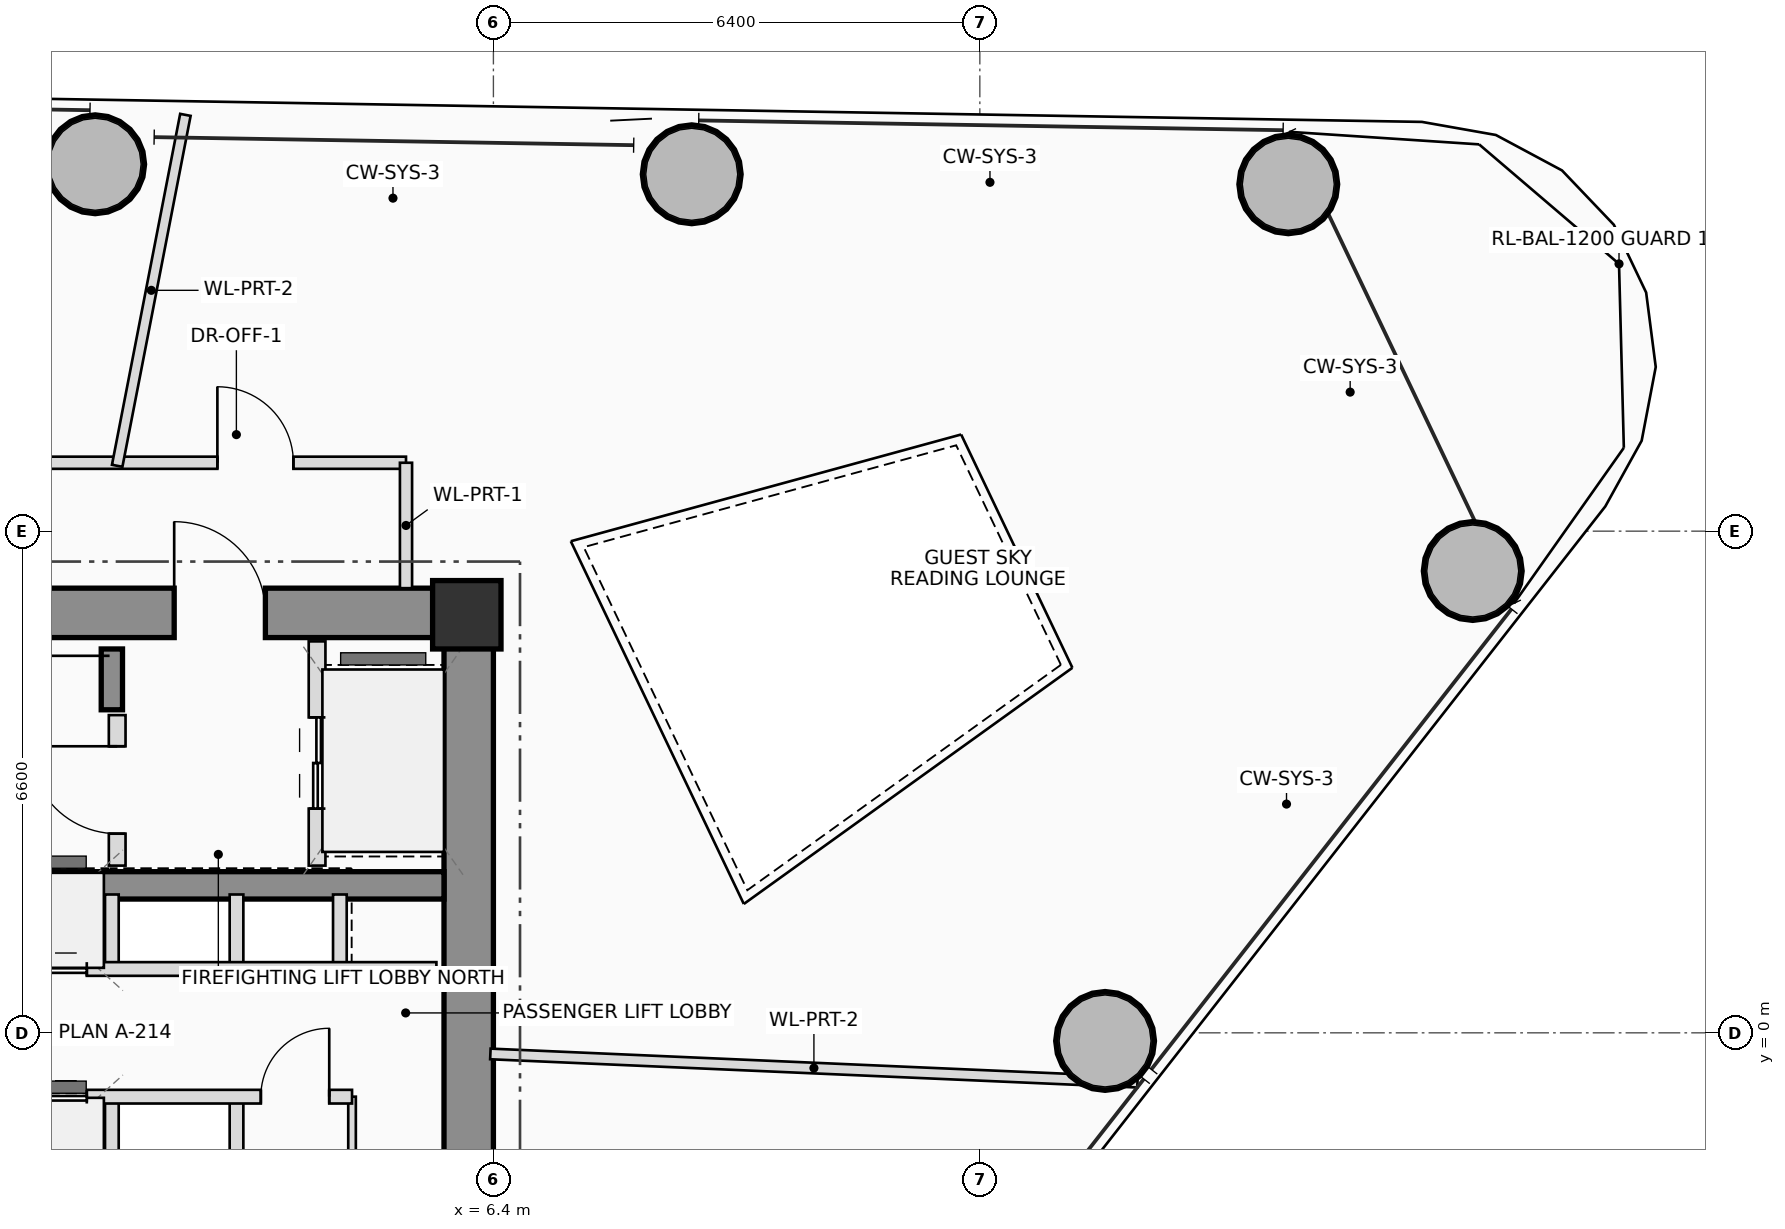
"""IFC4 building model, lengths in metres.
Left out: names, types, materials, properties, quantities, classifications, styles, units other than length and angle.
Written with IfcOpenShell. Run it as: python <this file> out.ifc"""

import sys

from ifc_helpers import new_model, si_unit, direction, frame, frame_2d, origin, origin_2d, place, context, subcontext, project, spatial, rectangle, hollow_circle, extrude, source, transform, mapped, element, fill, save


model = new_model("IFC4")
c1 = context("Model", 3, precision=1e-05, world=origin(), true_north=direction((0.0, 1.0)))
c2 = subcontext(c1, "Body", "Model", "MODEL_VIEW")
j1 = project(units=[si_unit("LENGTHUNIT", "METRE"), si_unit("PLANEANGLEUNIT", "RADIAN")], contexts=[c1])
p1 = place(None, origin())
s1 = spatial("IfcSite", under=j1, at=p1, CompositionType="ELEMENT")
p2 = place(p1, origin())
s2 = spatial("IfcBuilding", under=s1, at=p2, CompositionType="ELEMENT")
p3 = place(p2, frame((0.0, 0.0, 146.75)))
s3 = spatial("IfcBuildingStorey", under=s2, at=p3, CompositionType="ELEMENT", Elevation=146.75)
m1 = source(origin(), c2, "Body", "SweptSolid", [
    extrude(rectangle(XDim=0.9, YDim=0.9, at=origin_2d()), origin(), (0.0, 0.0, 1.0), 3.45),
])
p4 = place(p3, frame((6.05, 5.5, 0.0), z_axis=(0.0, 0.0, 1.0), x_axis=(1.0, 0.0, 0.0)))
e1 = element("IfcColumn", 1, at=p4, inside=s3, PredefinedType="COLUMN", context=c2, shape_type="MappedRepresentation", body=[
    mapped(m1, transform((0.0, 0.0, 0.0), scale=1.0)),
])
p5 = place(p3, frame((-6.4, 5.525, 0.0), z_axis=(0.0, 0.0, 1.0), x_axis=(1.0, 0.0, 0.0)))
e2 = element("IfcWall", 2, at=p5, inside=s3, PredefinedType="SHEAR", context=c2, shape_type="SweptSolid", body=[
    extrude(rectangle(XDim=12.8, YDim=0.65, at=frame_2d((6.4, 0.0))), origin(), (0.0, 0.0, 1.0), 3.45),
])
p6 = place(p5, frame((8.6, 0.0, 0.0)))
e3 = element("IfcOpeningElement", 3, at=p6, cuts=e2, PredefinedType="OPENING", context=c2, shape_type="SweptSolid", body=[
    extrude(rectangle(XDim=1.2, YDim=2.2, at=frame_2d((0.6, 1.1))), frame((0.0, 0.335, 0.0), z_axis=(0.0, -1.0, 0.0), x_axis=(1.0, 0.0, 0.0)), (0.0, 0.0, 1.0), 0.67),
])
p7 = place(p3, frame((6.075, -5.2, 0.0), z_axis=(0.0, 0.0, 1.0), x_axis=(0.0, 1.0, 0.0)))
e4 = element("IfcWall", 4, at=p7, inside=s3, PredefinedType="SHEAR", context=c2, shape_type="SweptSolid", body=[
    extrude(rectangle(XDim=10.4, YDim=0.65, at=frame_2d((5.2, 0.0))), origin(), (0.0, 0.0, 1.0), 3.45),
])
p8 = place(p3, frame((-5.75, 1.94, 0.0), z_axis=(0.0, 0.0, 1.0), x_axis=(1.0, 0.0, 0.0)))
e5 = element("IfcWall", 5, at=p8, inside=s3, PredefinedType="SHEAR", context=c2, shape_type="SweptSolid", body=[
    extrude(rectangle(XDim=11.5, YDim=0.36, at=frame_2d((5.75, 0.0))), origin(), (0.0, 0.0, 1.0), 3.45),
])
p9 = place(p3, frame((1.38, 4.25, 0.0), z_axis=(0.0, 0.0, 1.0), x_axis=(0.0, 1.0, 0.0)))
e6 = element("IfcWall", 6, at=p9, inside=s3, PredefinedType="SHEAR", context=c2, shape_type="SweptSolid", body=[
    extrude(rectangle(XDim=0.8, YDim=0.28, at=frame_2d((0.4, 0.0))), origin(), (0.0, 0.0, 1.0), 3.45),
])
m2 = source(origin(), c2, "Body", "SweptSolid", [
    extrude(hollow_circle(Radius=0.65, WallThickness=0.045, at=origin_2d()), origin(), (0.0, 0.0, 1.0), 3.45),
])
for number, where, z_axis, x_axis in (
    (7, (14.448, -0.107, 0.0), (0.0, 0.0, 1.0), (1.0, 0.0, 0.0)),
    (8, (19.285, 6.076, 0.0), (0.0, 0.0, 1.0), (1.0, 0.0, 0.0)),
    (9, (16.858, 11.164, 0.0), (0.0, 0.0, 1.0), (1.0, 0.0, 0.0)),
    (10, (9.01, 11.295, 0.0), (0.0, 0.0, 1.0), (1.0, 0.0, 0.0)),
    (11, (1.16, 11.427, 0.0), (0.0, 0.0, 1.0), (1.0, 0.0, 0.0)),
):
    element("IfcColumn", number, at=place(p3, frame(where, z_axis=z_axis, x_axis=x_axis)), inside=s3, PredefinedType="COLUMN", context=c2, shape_type="MappedRepresentation", body=[
        mapped(m2, transform((0.0, 0.0, 0.0), scale=1.0)),
    ])
p10 = place(p3, frame((1.45, 2.2, 0.0), z_axis=(0.0, 0.0, 1.0), x_axis=(0.0, 1.0, 0.0)))
e12 = element("IfcWall", 12, at=p10, inside=s3, PredefinedType="PLUMBINGWALL", context=c2, shape_type="SweptSolid", body=[
    extrude(rectangle(XDim=1.98, YDim=0.22, at=frame_2d((0.99, 0.0))), origin(), (0.0, 0.0, 1.0), 3.25),
])
p11 = place(p10, frame((0.42, 0.0, 0.0)))
e13 = element("IfcOpeningElement", 13, at=p11, cuts=e12, PredefinedType="OPENING", context=c2, shape_type="SweptSolid", body=[
    extrude(rectangle(XDim=1.15, YDim=2.15, at=frame_2d((0.575, 1.075))), frame((0.0, 0.12, 0.0), z_axis=(0.0, -1.0, 0.0), x_axis=(1.0, 0.0, 0.0)), (0.0, 0.0, 1.0), 0.24),
])
p12 = place(p3, frame((4.08, 2.2, 0.0), z_axis=(0.0, 0.0, 1.0), x_axis=(0.0, 1.0, 0.0)))
e14 = element("IfcWall", 14, at=p12, inside=s3, PredefinedType="PLUMBINGWALL", context=c2, shape_type="SweptSolid", body=[
    extrude(rectangle(XDim=2.95, YDim=0.22, at=frame_2d((1.475, 0.0))), origin(), (0.0, 0.0, 1.0), 3.25),
])
p13 = place(p12, frame((0.75, 0.0, 0.0)))
e15 = element("IfcOpeningElement", 15, at=p13, cuts=e14, PredefinedType="OPENING", context=c2, shape_type="SweptSolid", body=[
    extrude(rectangle(XDim=1.2, YDim=2.25, at=frame_2d((0.6, 1.125))), frame((0.0, 0.12, 0.0), z_axis=(0.0, -1.0, 0.0), x_axis=(1.0, 0.0, 0.0)), (0.0, 0.0, 1.0), 0.24),
])
for number, where, z_axis, x_axis in (
    (16, (1.38, 0.84, 0.0), (0.0, 0.0, 1.0), (0.0, 1.0, 0.0)),
    (17, (1.38, -1.82, 0.0), (0.0, 0.0, 1.0), (0.0, 1.0, 0.0)),
    (18, (3.02, 0.84, 0.0), (0.0, 0.0, 1.0), (0.0, 1.0, 0.0)),
    (19, (4.38, 0.84, 0.0), (0.0, 0.0, 1.0), (0.0, 1.0, 0.0)),
    (20, (3.02, -1.82, 0.0), (0.0, 0.0, 1.0), (0.0, 1.0, 0.0)),
):
    element("IfcWall", number, at=place(p3, frame(where, z_axis=z_axis, x_axis=x_axis)), inside=s3, PredefinedType="PLUMBINGWALL", context=c2, shape_type="SweptSolid", body=[
        extrude(rectangle(XDim=0.98, YDim=0.18, at=frame_2d((0.49, 0.0))), origin(), (0.0, 0.0, 1.0), 3.25),
    ])
p14 = place(p3, frame((4.54, -1.82, 0.0), z_axis=(0.0, 0.0, 1.0), x_axis=(0.0, 1.0, 0.0)))
e21 = element("IfcWall", 21, at=p14, inside=s3, PredefinedType="PARTITIONING", context=c2, shape_type="SweptSolid", body=[
    extrude(rectangle(XDim=0.98, YDim=0.1, at=frame_2d((0.49, 0.0))), origin(), (0.0, 0.0, 1.0), 3.25),
])
p15 = place(p3, frame((-5.68, 0.84, 0.0), z_axis=(0.0, 0.0, 1.0), x_axis=(1.0, 0.0, 0.0)))
e22 = element("IfcWall", 22, at=p15, inside=s3, PredefinedType="PLUMBINGWALL", context=c2, shape_type="SweptSolid", body=[
    extrude(rectangle(XDim=11.33, YDim=0.18, at=frame_2d((5.665, 0.0))), origin(), (0.0, 0.0, 1.0), 3.25),
])
p16 = place(p15, frame((1.38, 0.0, 0.0)))
e23 = element("IfcOpeningElement", 23, at=p16, cuts=e22, PredefinedType="OPENING", context=c2, shape_type="SweptSolid", body=[
    extrude(rectangle(XDim=0.9, YDim=2.05, at=frame_2d((0.45, 1.025))), frame((0.0, 0.1, 0.0), z_axis=(0.0, -1.0, 0.0), x_axis=(1.0, 0.0, 0.0)), (0.0, 0.0, 1.0), 0.2),
])
p17 = place(p15, frame((3.93, 0.0, 0.0)))
e24 = element("IfcOpeningElement", 24, at=p17, cuts=e22, PredefinedType="OPENING", context=c2, shape_type="SweptSolid", body=[
    extrude(rectangle(XDim=1.1, YDim=2.2, at=frame_2d((0.55, 1.1))), frame((0.0, 0.1, 0.0), z_axis=(0.0, -1.0, 0.0), x_axis=(1.0, 0.0, 0.0)), (0.0, 0.0, 1.0), 0.2),
])
p18 = place(p15, frame((5.63, 0.0, 0.0)))
e25 = element("IfcOpeningElement", 25, at=p18, cuts=e22, PredefinedType="OPENING", context=c2, shape_type="SweptSolid", body=[
    extrude(rectangle(XDim=1.1, YDim=2.2, at=frame_2d((0.55, 1.1))), frame((0.0, 0.1, 0.0), z_axis=(0.0, -1.0, 0.0), x_axis=(1.0, 0.0, 0.0)), (0.0, 0.0, 1.0), 0.2),
])
p19 = place(p3, frame((-5.68, -0.84, 0.0), z_axis=(0.0, 0.0, 1.0), x_axis=(1.0, 0.0, 0.0)))
e26 = element("IfcWall", 26, at=p19, inside=s3, PredefinedType="PLUMBINGWALL", context=c2, shape_type="SweptSolid", body=[
    extrude(rectangle(XDim=10.22, YDim=0.18, at=frame_2d((5.11, 0.0))), origin(), (0.0, 0.0, 1.0), 3.25),
])
p20 = place(p19, frame((1.38, 0.0, 0.0)))
e27 = element("IfcOpeningElement", 27, at=p20, cuts=e26, PredefinedType="OPENING", context=c2, shape_type="SweptSolid", body=[
    extrude(rectangle(XDim=0.9, YDim=2.05, at=frame_2d((0.45, 1.025))), frame((0.0, 0.1, 0.0), z_axis=(0.0, -1.0, 0.0), x_axis=(1.0, 0.0, 0.0)), (0.0, 0.0, 1.0), 0.2),
])
p21 = place(p19, frame((3.93, 0.0, 0.0)))
e28 = element("IfcOpeningElement", 28, at=p21, cuts=e26, PredefinedType="OPENING", context=c2, shape_type="SweptSolid", body=[
    extrude(rectangle(XDim=1.1, YDim=2.2, at=frame_2d((0.55, 1.1))), frame((0.0, 0.1, 0.0), z_axis=(0.0, -1.0, 0.0), x_axis=(1.0, 0.0, 0.0)), (0.0, 0.0, 1.0), 0.2),
])
p22 = place(p19, frame((5.63, 0.0, 0.0)))
e29 = element("IfcOpeningElement", 29, at=p22, cuts=e26, PredefinedType="OPENING", context=c2, shape_type="SweptSolid", body=[
    extrude(rectangle(XDim=1.1, YDim=2.2, at=frame_2d((0.55, 1.1))), frame((0.0, 0.1, 0.0), z_axis=(0.0, -1.0, 0.0), x_axis=(1.0, 0.0, 0.0)), (0.0, 0.0, 1.0), 0.2),
])
p23 = place(p19, frame((9.02, 0.0, 0.0)))
e30 = element("IfcOpeningElement", 30, at=p23, cuts=e26, PredefinedType="OPENING", context=c2, shape_type="SweptSolid", body=[
    extrude(rectangle(XDim=0.9, YDim=2.05, at=frame_2d((0.45, 1.025))), frame((0.0, 0.1, 0.0), z_axis=(0.0, -1.0, 0.0), x_axis=(1.0, 0.0, 0.0)), (0.0, 0.0, 1.0), 0.2),
])
p24 = place(p3, frame((-6.36, 7.5, 0.0), z_axis=(0.0, 0.0, 1.0), x_axis=(1.0, 0.0, 0.0)))
e31 = element("IfcWall", 31, at=p24, inside=s3, PredefinedType="PARTITIONING", context=c2, shape_type="SweptSolid", body=[
    extrude(rectangle(XDim=11.61, YDim=0.16, at=frame_2d((5.805, 0.0))), origin(), (0.0, 0.0, 1.0), 2.605),
])
p25 = place(p24, frame((9.128, 0.0, 0.0)))
e32 = element("IfcOpeningElement", 32, at=p25, cuts=e31, PredefinedType="OPENING", context=c2, shape_type="SweptSolid", body=[
    extrude(rectangle(XDim=1.0, YDim=2.25, at=frame_2d((0.5, 1.125))), frame((0.0, 0.09, 0.0), z_axis=(0.0, -1.0, 0.0), x_axis=(1.0, 0.0, 0.0)), (0.0, 0.0, 1.0), 0.18),
])
p26 = place(p3, frame((5.25, 7.5, 0.0), z_axis=(0.0, 0.0, 1.0), x_axis=(0.0, -1.0, 0.0)))
e33 = element("IfcWall", 33, at=p26, inside=s3, PredefinedType="PARTITIONING", context=c2, shape_type="SweptSolid", body=[
    extrude(rectangle(XDim=1.65, YDim=0.16, at=frame_2d((0.825, 0.0))), origin(), (0.0, 0.0, 1.0), 2.605),
])
p27 = place(p3, frame((6.36, -0.278, 0.0), z_axis=(0.0, 0.0, 1.0), x_axis=(0.999047707238, -0.043631166178, 0.0)))
e34 = element("IfcWall", 34, at=p27, inside=s3, PredefinedType="PARTITIONING", context=c2, shape_type="SweptSolid", body=[
    extrude(rectangle(XDim=8.522, YDim=0.14, at=frame_2d((4.261, 0.0))), origin(), (0.0, 0.0, 1.0), 2.605),
])
p28 = place(p3, frame((1.45, 7.46, 0.0), z_axis=(0.0, 0.0, 1.0), x_axis=(0.190762676882, 0.981636185717, 0.0)))
e35 = element("IfcWall", 35, at=p28, inside=s3, PredefinedType="PARTITIONING", context=c2, shape_type="SweptSolid", body=[
    extrude(rectangle(XDim=4.703, YDim=0.14, at=frame_2d((2.352, 0.0))), origin(), (0.0, 0.0, 1.0), 2.605),
])
p29 = place(p6, origin())
e36 = element("IfcDoor", 36, at=p29, inside=s3, OperationType="SINGLE_SWING_LEFT", PredefinedType="DOOR", context=c2, shape_type="SweptSolid", body=[
    extrude(rectangle(XDim=1.2, YDim=2.2, at=frame_2d((0.6, 1.1))), frame((0.0, 0.025, 0.0), z_axis=(0.0, -1.0, 0.0), x_axis=(1.0, 0.0, 0.0)), (0.0, 0.0, 1.0), 0.05),
])
fill(e3, e36)
p30 = place(p11, origin())
e37 = element("IfcDoor", 37, at=p30, inside=s3, OperationType="SINGLE_SWING_RIGHT", PredefinedType="DOOR", context=c2, shape_type="SweptSolid", body=[
    extrude(rectangle(XDim=1.15, YDim=2.15, at=frame_2d((0.575, 1.075))), frame((0.0, 0.025, 0.0), z_axis=(0.0, -1.0, 0.0), x_axis=(1.0, 0.0, 0.0)), (0.0, 0.0, 1.0), 0.05),
])
fill(e13, e37)
p31 = place(p13, origin())
e38 = element("IfcDoor", 38, at=p31, inside=s3, OperationType="DOUBLE_DOOR_SLIDING", PredefinedType="DOOR", context=c2, shape_type="SweptSolid", body=[
    extrude(rectangle(XDim=1.2, YDim=2.25, at=frame_2d((0.6, 1.125))), frame((0.0, 0.025, 0.0), z_axis=(0.0, -1.0, 0.0), x_axis=(1.0, 0.0, 0.0)), (0.0, 0.0, 1.0), 0.05),
])
fill(e15, e38)
p32 = place(p18, origin())
e39 = element("IfcDoor", 39, at=p32, inside=s3, OperationType="DOUBLE_DOOR_SLIDING", PredefinedType="DOOR", context=c2, shape_type="SweptSolid", body=[
    extrude(rectangle(XDim=1.1, YDim=2.2, at=frame_2d((0.55, 1.1))), frame((0.0, 0.025, 0.0), z_axis=(0.0, -1.0, 0.0), x_axis=(1.0, 0.0, 0.0)), (0.0, 0.0, 1.0), 0.05),
])
fill(e25, e39)
p33 = place(p22, origin())
e40 = element("IfcDoor", 40, at=p33, inside=s3, OperationType="DOUBLE_DOOR_SLIDING", PredefinedType="DOOR", context=c2, shape_type="SweptSolid", body=[
    extrude(rectangle(XDim=1.1, YDim=2.2, at=frame_2d((0.55, 1.1))), frame((0.0, 0.025, 0.0), z_axis=(0.0, -1.0, 0.0), x_axis=(1.0, 0.0, 0.0)), (0.0, 0.0, 1.0), 0.05),
])
fill(e29, e40)
p34 = place(p23, origin())
e41 = element("IfcDoor", 41, at=p34, inside=s3, OperationType="SINGLE_SWING_RIGHT", PredefinedType="DOOR", context=c2, shape_type="SweptSolid", body=[
    extrude(rectangle(XDim=0.9, YDim=2.05, at=frame_2d((0.45, 1.025))), frame((0.0, 0.025, 0.0), z_axis=(0.0, -1.0, 0.0), x_axis=(1.0, 0.0, 0.0)), (0.0, 0.0, 1.0), 0.05),
])
fill(e30, e41)
p35 = place(p25, origin())
e42 = element("IfcDoor", 42, at=p35, inside=s3, OperationType="SINGLE_SWING_LEFT", PredefinedType="DOOR", context=c2, shape_type="SweptSolid", body=[
    extrude(rectangle(XDim=1.0, YDim=2.25, at=frame_2d((0.5, 1.125))), frame((0.0, 0.025, 0.0), z_axis=(0.0, -1.0, 0.0), x_axis=(1.0, 0.0, 0.0)), (0.0, 0.0, 1.0), 0.05),
])
fill(e32, e42)
save(model, sys.argv[1])
